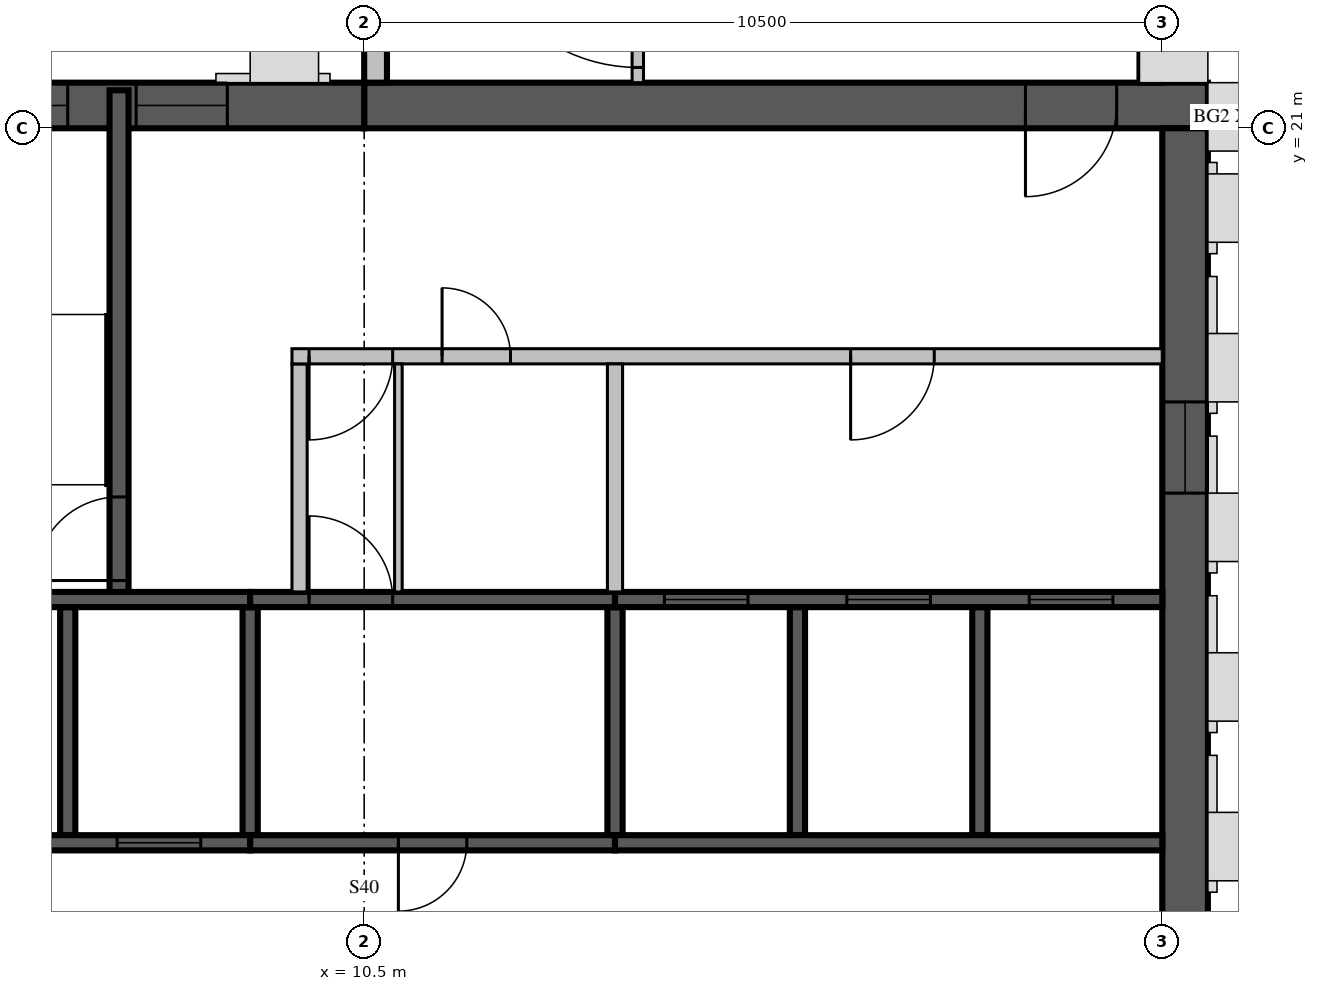
"""IFC4 building model, lengths in metres.
Left out: names, types, materials, properties, quantities, classifications, styles, units other than length and angle.
Written with IfcOpenShell. Run it as: python <this file> out.ifc"""

import sys

from ifc_helpers import new_model, si_unit, direction, frame, frame_2d, origin, place, context, subcontext, project, spatial, rectangle, extrude, source, transform, mapped, element, fill, save


model = new_model("IFC4")
c1 = context("Model", 3, precision=1e-05, world=origin(), true_north=direction((0.0, 1.0)))
c2 = subcontext(c1, "Body", "Model", "MODEL_VIEW")
j1 = project(units=[si_unit("LENGTHUNIT", "METRE"), si_unit("PLANEANGLEUNIT", "RADIAN")], contexts=[c1])
p1 = place(None, origin())
s1 = spatial("IfcSite", under=j1, at=p1, CompositionType="ELEMENT")
p2 = place(p1, origin())
s2 = spatial("IfcBuilding", under=s1, at=p2, CompositionType="ELEMENT")
p3 = place(p2, frame((0.0, 0.0, 344.0)))
s3 = spatial("IfcBuildingStorey", under=s2, at=p3, CompositionType="ELEMENT", Elevation=344.0)
m1 = source(origin(), c2, "Body", "SweptSolid", [
    extrude(rectangle(XDim=11.1, YDim=0.6, at=frame_2d((5.55, 0.0))), origin(), (0.0, 0.0, 1.0), 3.5),
])
p4 = place(p3, frame((10.5, 21.3, 0.0), z_axis=(0.0, 0.0, 1.0), x_axis=(1.0, 0.0, 0.0)))
e1 = element("IfcWall", 1, at=p4, inside=s3, PredefinedType="SHEAR", context=c2, shape_type="MappedRepresentation", body=[
    mapped(m1, transform((0.0, 0.0, 0.0), scale=1.0)),
])
m2 = source(origin(), c2, "Body", "SweptSolid", [
    extrude(rectangle(XDim=1.2, YDim=2.1, at=frame_2d((0.6, 1.05))), frame((0.0, 0.31, 0.0), z_axis=(0.0, -1.0, 0.0), x_axis=(1.0, 0.0, 0.0)), (0.0, 0.0, 1.0), 0.62),
])
p5 = place(p4, frame((8.7, 0.0, 0.0)))
e2 = element("IfcOpeningElement", 2, at=p5, cuts=e1, PredefinedType="OPENING", context=c2, shape_type="MappedRepresentation", body=[
    mapped(m2, transform((0.0, 0.0, 0.0), scale=1.0)),
])
m3 = source(origin(), c2, "Body", "SweptSolid", [
    extrude(rectangle(XDim=16.8, YDim=0.6, at=frame_2d((8.4, 0.0))), origin(), (0.0, 0.0, 1.0), 3.5),
])
p6 = place(p3, frame((21.3, 4.2, 0.0), z_axis=(0.0, 0.0, 1.0), x_axis=(0.0, 1.0, 0.0)))
e3 = element("IfcWall", 3, at=p6, inside=s3, PredefinedType="SHEAR", context=c2, shape_type="MappedRepresentation", body=[
    mapped(m3, transform((0.0, 0.0, 0.0), scale=1.0)),
])
m4 = source(origin(), c2, "Body", "SweptSolid", [
    extrude(rectangle(XDim=1.2, YDim=2.4, at=frame_2d((0.6, 1.2))), frame((0.0, 0.31, 0.0), z_axis=(0.0, -1.0, 0.0), x_axis=(1.0, 0.0, 0.0)), (0.0, 0.0, 1.0), 0.62),
])
p7 = place(p6, frame((12.0, 0.0, 0.6)))
e4 = element("IfcOpeningElement", 4, at=p7, cuts=e3, PredefinedType="OPENING", context=c2, shape_type="MappedRepresentation", body=[
    mapped(m4, transform((0.0, 0.0, 0.0), scale=1.0)),
])
m5 = source(origin(), c2, "Body", "SweptSolid", [
    extrude(rectangle(XDim=6.6, YDim=0.6, at=frame_2d((3.3, 0.0))), origin(), (0.0, 0.0, 1.0), 3.5),
])
p8 = place(p3, frame((3.9, 21.3, 0.0), z_axis=(0.0, 0.0, 1.0), x_axis=(1.0, 0.0, 0.0)))
e5 = element("IfcWall", 5, at=p8, inside=s3, PredefinedType="SHEAR", context=c2, shape_type="MappedRepresentation", body=[
    mapped(m5, transform((0.0, 0.0, 0.0), scale=1.0)),
])
p9 = place(p8, frame((1.5, 0.0, 0.6)))
e6 = element("IfcOpeningElement", 6, at=p9, cuts=e5, PredefinedType="OPENING", context=c2, shape_type="MappedRepresentation", body=[
    mapped(m4, transform((0.0, 0.0, 0.0), scale=1.0)),
])
p10 = place(p8, frame((3.6, 0.0, 0.6)))
e7 = element("IfcOpeningElement", 7, at=p10, cuts=e5, PredefinedType="OPENING", context=c2, shape_type="MappedRepresentation", body=[
    mapped(m4, transform((0.0, 0.0, 0.0), scale=1.0)),
])
m6 = source(origin(), c2, "Body", "SweptSolid", [
    extrude(rectangle(XDim=7.5, YDim=0.3, at=frame_2d((3.75, 0.0))), origin(), (0.0, 0.0, 1.0), 3.1),
])
p11 = place(p3, frame((20.85, 21.6, 0.0), z_axis=(0.0, 0.0, 1.0), x_axis=(0.0, 1.0, 0.0)))
e8 = element("IfcWall", 8, at=p11, inside=s3, PredefinedType="STANDARD", context=c2, shape_type="MappedRepresentation", body=[
    mapped(m6, transform((0.0, 0.0, 0.0), scale=1.0)),
])
m7 = source(origin(), c2, "Body", "SweptSolid", [
    extrude(rectangle(XDim=1.8, YDim=2.0, at=frame_2d((0.9, 1.0))), frame((0.0, 0.16, 0.0), z_axis=(0.0, -1.0, 0.0), x_axis=(1.0, 0.0, 0.0)), (0.0, 0.0, 1.0), 0.32),
])
p12 = place(p11, frame((0.463, 0.0, 0.6)))
e9 = element("IfcOpeningElement", 9, at=p12, cuts=e8, PredefinedType="OPENING", context=c2, shape_type="MappedRepresentation", body=[
    mapped(m7, transform((0.0, 0.0, 0.0), scale=1.0)),
])
m8 = source(origin(), c2, "Body", "SweptSolid", [
    extrude(rectangle(XDim=3.0, YDim=2.0, at=frame_2d((1.5, 1.0))), frame((0.0, 0.16, 0.0), z_axis=(0.0, -1.0, 0.0), x_axis=(1.0, 0.0, 0.0)), (0.0, 0.0, 1.0), 0.32),
])
p13 = place(p11, frame((4.2, 0.0, 0.6)))
e10 = element("IfcOpeningElement", 10, at=p13, cuts=e8, PredefinedType="OPENING", context=c2, shape_type="MappedRepresentation", body=[
    mapped(m8, transform((0.0, 0.0, 0.0), scale=1.0)),
])
p14 = place(p3, frame((10.65, 29.1, 0.0), z_axis=(0.0, 0.0, 1.0), x_axis=(0.0, -1.0, 0.0)))
e11 = element("IfcWall", 11, at=p14, inside=s3, PredefinedType="STANDARD", context=c2, shape_type="MappedRepresentation", body=[
    mapped(m6, transform((0.0, 0.0, 0.0), scale=1.0)),
])
m9 = source(origin(), c2, "Body", "SweptSolid", [
    extrude(rectangle(XDim=3.6, YDim=2.0, at=frame_2d((1.8, 1.0))), frame((0.0, 0.16, 0.0), z_axis=(0.0, -1.0, 0.0), x_axis=(1.0, 0.0, 0.0)), (0.0, 0.0, 1.0), 0.32),
])
p15 = place(p14, frame((3.36, 0.0, 0.6)))
e12 = element("IfcOpeningElement", 12, at=p15, cuts=e11, PredefinedType="OPENING", context=c2, shape_type="MappedRepresentation", body=[
    mapped(m9, transform((0.0, 0.0, 0.0), scale=1.0)),
])
m10 = source(origin(), c2, "Body", "SweptSolid", [
    extrude(rectangle(XDim=2.4, YDim=2.0, at=frame_2d((1.2, 1.0))), frame((0.0, 0.16, 0.0), z_axis=(0.0, -1.0, 0.0), x_axis=(1.0, 0.0, 0.0)), (0.0, 0.0, 1.0), 0.32),
])
p16 = place(p14, frame((0.48, 0.0, 0.6)))
e13 = element("IfcOpeningElement", 13, at=p16, cuts=e11, PredefinedType="OPENING", context=c2, shape_type="MappedRepresentation", body=[
    mapped(m10, transform((0.0, 0.0, 0.0), scale=1.0)),
])
m11 = source(origin(), c2, "Body", "SweptSolid", [
    extrude(rectangle(XDim=3.0, YDim=0.2, at=frame_2d((1.5, 0.0))), origin(), (0.0, 0.0, 1.0), 3.5),
])
p17 = place(p3, frame((6.6, 11.7, 0.0), z_axis=(0.0, 0.0, 1.0), x_axis=(0.0, 1.0, 0.0)))
e14 = element("IfcWall", 14, at=p17, inside=s3, PredefinedType="SOLIDWALL", context=c2, shape_type="MappedRepresentation", body=[
    mapped(m11, transform((0.0, 0.0, 0.0), scale=1.0)),
])
m12 = source(origin(), c2, "Body", "SweptSolid", [
    extrude(rectangle(XDim=3.0, YDim=0.2, at=frame_2d((1.5, 0.0))), origin(), (0.0, 0.0, 1.0), 3.1),
])
for number, where, z_axis, x_axis in (
    (15, (9.0, 11.7, 0.0), (0.0, 0.0, 1.0), (0.0, 1.0, 0.0)),
    (16, (13.8, 11.7, 0.0), (0.0, 0.0, 1.0), (0.0, 1.0, 0.0)),
):
    element("IfcWall", number, at=place(p3, frame(where, z_axis=z_axis, x_axis=x_axis)), inside=s3, PredefinedType="SOLIDWALL", context=c2, shape_type="MappedRepresentation", body=[
        mapped(m12, transform((0.0, 0.0, 0.0), scale=1.0)),
    ])
for number, where, z_axis, x_axis in (
    (17, (16.2, 11.7, 0.0), (0.0, 0.0, 1.0), (0.0, 1.0, 0.0)),
    (18, (18.6, 11.7, 0.0), (0.0, 0.0, 1.0), (0.0, 1.0, 0.0)),
):
    element("IfcWall", number, at=place(p3, frame(where, z_axis=z_axis, x_axis=x_axis)), inside=s3, PredefinedType="SOLIDWALL", context=c2, shape_type="MappedRepresentation", body=[
        mapped(m11, transform((0.0, 0.0, 0.0), scale=1.0)),
    ])
m13 = source(origin(), c2, "Body", "SweptSolid", [
    extrude(rectangle(XDim=4.8, YDim=0.2, at=frame_2d((2.4, 0.0))), origin(), (0.0, 0.0, 1.0), 3.5),
])
p18 = place(p3, frame((4.2, 11.6, 0.0), z_axis=(0.0, 0.0, 1.0), x_axis=(1.0, 0.0, 0.0)))
e19 = element("IfcWall", 19, at=p18, inside=s3, PredefinedType="SOLIDWALL", context=c2, shape_type="MappedRepresentation", body=[
    mapped(m13, transform((0.0, 0.0, 0.0), scale=1.0)),
])
m14 = source(origin(), c2, "Body", "SweptSolid", [
    extrude(rectangle(XDim=1.1, YDim=2.1, at=frame_2d((0.55, 1.05))), frame((0.0, 0.11, 0.0), z_axis=(0.0, -1.0, 0.0), x_axis=(1.0, 0.0, 0.0)), (0.0, 0.0, 1.0), 0.22),
])
p19 = place(p18, frame((0.65, 0.0, 0.0)))
e20 = element("IfcOpeningElement", 20, at=p19, cuts=e19, PredefinedType="OPENING", context=c2, shape_type="MappedRepresentation", body=[
    mapped(m14, transform((0.0, 0.0, 0.0), scale=1.0)),
])
p20 = place(p18, frame((3.05, 0.0, 0.0)))
e21 = element("IfcOpeningElement", 21, at=p20, cuts=e19, PredefinedType="OPENING", context=c2, shape_type="MappedRepresentation", body=[
    mapped(m14, transform((0.0, 0.0, 0.0), scale=1.0)),
])
m15 = source(origin(), c2, "Body", "SweptSolid", [
    extrude(rectangle(XDim=4.8, YDim=0.2, at=frame_2d((2.4, 0.0))), origin(), (0.0, 0.0, 1.0), 3.1),
])
p21 = place(p3, frame((9.0, 11.6, 0.0), z_axis=(0.0, 0.0, 1.0), x_axis=(1.0, 0.0, 0.0)))
e22 = element("IfcWall", 22, at=p21, inside=s3, PredefinedType="SOLIDWALL", context=c2, shape_type="MappedRepresentation", body=[
    mapped(m15, transform((0.0, 0.0, 0.0), scale=1.0)),
])
m16 = source(origin(), c2, "Body", "SweptSolid", [
    extrude(rectangle(XDim=0.9, YDim=2.1, at=frame_2d((0.45, 1.05))), frame((0.0, 0.11, 0.0), z_axis=(0.0, -1.0, 0.0), x_axis=(1.0, 0.0, 0.0)), (0.0, 0.0, 1.0), 0.22),
])
p22 = place(p21, frame((1.95, 0.0, 0.0)))
e23 = element("IfcOpeningElement", 23, at=p22, cuts=e22, PredefinedType="OPENING", context=c2, shape_type="MappedRepresentation", body=[
    mapped(m16, transform((0.0, 0.0, 0.0), scale=1.0)),
])
m17 = source(origin(), c2, "Body", "SweptSolid", [
    extrude(rectangle(XDim=7.2, YDim=0.2, at=frame_2d((3.6, 0.0))), origin(), (0.0, 0.0, 1.0), 3.5),
])
p23 = place(p3, frame((13.8, 11.6, 0.0), z_axis=(0.0, 0.0, 1.0), x_axis=(1.0, 0.0, 0.0)))
e24 = element("IfcWall", 24, at=p23, inside=s3, PredefinedType="SOLIDWALL", context=c2, shape_type="MappedRepresentation", body=[
    mapped(m17, transform((0.0, 0.0, 0.0), scale=1.0)),
])
p24 = place(p3, frame((4.2, 14.8, 0.0), z_axis=(0.0, 0.0, 1.0), x_axis=(1.0, 0.0, 0.0)))
e25 = element("IfcWall", 25, at=p24, inside=s3, PredefinedType="SOLIDWALL", context=c2, shape_type="MappedRepresentation", body=[
    mapped(m13, transform((0.0, 0.0, 0.0), scale=1.0)),
])
p25 = place(p3, frame((9.0, 14.8, 0.0), z_axis=(0.0, 0.0, 1.0), x_axis=(1.0, 0.0, 0.0)))
e26 = element("IfcWall", 26, at=p25, inside=s3, PredefinedType="SOLIDWALL", context=c2, shape_type="MappedRepresentation", body=[
    mapped(m15, transform((0.0, 0.0, 0.0), scale=1.0)),
])
p26 = place(p25, frame((0.775, 0.0, 0.0)))
e27 = element("IfcOpeningElement", 27, at=p26, cuts=e26, PredefinedType="OPENING", context=c2, shape_type="MappedRepresentation", body=[
    mapped(m14, transform((0.0, 0.0, 0.0), scale=1.0)),
])
p27 = place(p3, frame((13.8, 14.8, 0.0), z_axis=(0.0, 0.0, 1.0), x_axis=(1.0, 0.0, 0.0)))
e28 = element("IfcWall", 28, at=p27, inside=s3, PredefinedType="SOLIDWALL", context=c2, shape_type="MappedRepresentation", body=[
    mapped(m17, transform((0.0, 0.0, 0.0), scale=1.0)),
])
p28 = place(p27, frame((0.65, 0.0, 0.0)))
e29 = element("IfcOpeningElement", 29, at=p28, cuts=e28, PredefinedType="OPENING", context=c2, shape_type="MappedRepresentation", body=[
    mapped(m14, transform((0.0, 0.0, 0.0), scale=1.0)),
])
p29 = place(p27, frame((3.05, 0.0, 0.0)))
e30 = element("IfcOpeningElement", 30, at=p29, cuts=e28, PredefinedType="OPENING", context=c2, shape_type="MappedRepresentation", body=[
    mapped(m14, transform((0.0, 0.0, 0.0), scale=1.0)),
])
p30 = place(p27, frame((5.45, 0.0, 0.0)))
e31 = element("IfcOpeningElement", 31, at=p30, cuts=e28, PredefinedType="OPENING", context=c2, shape_type="MappedRepresentation", body=[
    mapped(m14, transform((0.0, 0.0, 0.0), scale=1.0)),
])
m18 = source(origin(), c2, "Body", "SweptSolid", [
    extrude(rectangle(XDim=6.6, YDim=0.25, at=frame_2d((3.3, 0.0))), origin(), (0.0, 0.0, 1.0), 3.1),
])
p31 = place(p3, frame((7.275, 14.9, 0.0), z_axis=(0.0, 0.0, 1.0), x_axis=(0.0, 1.0, 0.0)))
e32 = element("IfcWall", 32, at=p31, inside=s3, PredefinedType="SOLIDWALL", context=c2, shape_type="MappedRepresentation", body=[
    mapped(m18, transform((0.0, 0.0, 0.0), scale=1.0)),
])
m19 = source(origin(), c2, "Body", "SweptSolid", [
    extrude(rectangle(XDim=1.1, YDim=2.1, at=frame_2d((0.55, 1.05))), frame((0.0, 0.135, 0.0), z_axis=(0.0, -1.0, 0.0), x_axis=(1.0, 0.0, 0.0)), (0.0, 0.0, 1.0), 0.27),
])
p32 = place(p31, frame((0.15, 0.0, 0.0)))
e33 = element("IfcOpeningElement", 33, at=p32, cuts=e32, PredefinedType="OPENING", context=c2, shape_type="MappedRepresentation", body=[
    mapped(m19, transform((0.0, 0.0, 0.0), scale=1.0)),
])
m20 = source(origin(), c2, "Body", "SweptSolid", [
    extrude(rectangle(XDim=3.0, YDim=0.2, at=frame_2d((1.5, 0.0))), origin(), (0.0, 0.0, 1.0), 3.1),
])
p33 = place(p3, frame((9.65, 14.9, 0.0), z_axis=(0.0, 0.0, 1.0), x_axis=(0.0, 1.0, 0.0)))
e34 = element("IfcWall", 34, at=p33, inside=s3, PredefinedType="PARTITIONING", context=c2, shape_type="MappedRepresentation", body=[
    mapped(m20, transform((0.0, 0.0, 0.0), scale=1.0)),
])
m21 = source(origin(), c2, "Body", "SweptSolid", [
    extrude(rectangle(XDim=11.45, YDim=0.2, at=frame_2d((5.725, 0.0))), origin(), (0.0, 0.0, 1.0), 3.1),
])
p34 = place(p3, frame((9.55, 18.0, 0.0), z_axis=(0.0, 0.0, 1.0), x_axis=(1.0, 0.0, 0.0)))
e35 = element("IfcWall", 35, at=p34, inside=s3, PredefinedType="PARTITIONING", context=c2, shape_type="MappedRepresentation", body=[
    mapped(m21, transform((0.0, 0.0, 0.0), scale=1.0)),
])
p35 = place(p34, frame((0.225, 0.0, 0.0)))
e36 = element("IfcOpeningElement", 36, at=p35, cuts=e35, PredefinedType="OPENING", context=c2, shape_type="MappedRepresentation", body=[
    mapped(m14, transform((0.0, 0.0, 0.0), scale=1.0)),
])
p36 = place(p34, frame((1.975, 0.0, 0.0)))
e37 = element("IfcOpeningElement", 37, at=p36, cuts=e35, PredefinedType="OPENING", context=c2, shape_type="MappedRepresentation", body=[
    mapped(m16, transform((0.0, 0.0, 0.0), scale=1.0)),
])
p37 = place(p34, frame((7.35, 0.0, 0.0)))
e38 = element("IfcOpeningElement", 38, at=p37, cuts=e35, PredefinedType="OPENING", context=c2, shape_type="MappedRepresentation", body=[
    mapped(m14, transform((0.0, 0.0, 0.0), scale=1.0)),
])
p38 = place(p3, frame((13.8, 14.9, 0.0), z_axis=(0.0, 0.0, 1.0), x_axis=(0.0, 1.0, 0.0)))
e39 = element("IfcWall", 39, at=p38, inside=s3, PredefinedType="PARTITIONING", context=c2, shape_type="MappedRepresentation", body=[
    mapped(m20, transform((0.0, 0.0, 0.0), scale=1.0)),
])
m22 = source(origin(), c2, "Body", "SweptSolid", [
    extrude(rectangle(XDim=3.0, YDim=0.1, at=frame_2d((1.5, 0.0))), origin(), (0.0, 0.0, 1.0), 3.1),
])
p39 = place(p3, frame((10.95, 14.9, 0.0), z_axis=(0.0, 0.0, 1.0), x_axis=(0.0, 1.0, 0.0)))
e40 = element("IfcWall", 40, at=p39, inside=s3, PredefinedType="PARTITIONING", context=c2, shape_type="MappedRepresentation", body=[
    mapped(m22, transform((0.0, 0.0, 0.0), scale=1.0)),
])
m23 = source(origin(), c2, "Body", "SweptSolid", [
    extrude(rectangle(XDim=7.725, YDim=0.15, at=frame_2d((3.862, 0.0))), origin(), (0.0, 0.0, 1.0), 3.1),
])
p40 = place(p3, frame((14.1, 29.325, 0.0), z_axis=(0.0, 0.0, 1.0), x_axis=(0.0, -1.0, 0.0)))
e41 = element("IfcWall", 41, at=p40, inside=s3, PredefinedType="PARTITIONING", context=c2, shape_type="MappedRepresentation", body=[
    mapped(m23, transform((0.0, 0.0, 0.0), scale=1.0)),
])
m24 = source(origin(), c2, "Body", "SweptSolid", [
    extrude(rectangle(XDim=2.2, YDim=2.1, at=frame_2d((1.1, 1.05))), frame((0.0, 0.085, 0.0), z_axis=(0.0, -1.0, 0.0), x_axis=(1.0, 0.0, 0.0)), (0.0, 0.0, 1.0), 0.17),
])
p41 = place(p40, frame((5.325, 0.0, 0.0)))
e42 = element("IfcOpeningElement", 42, at=p41, cuts=e41, PredefinedType="OPENING", context=c2, shape_type="MappedRepresentation", body=[
    mapped(m24, transform((0.0, 0.0, 0.0), scale=1.0)),
])
m25 = source(origin(), c2, "Body", "SweptSolid", [
    extrude(rectangle(XDim=1.1, YDim=2.1, at=frame_2d((0.55, 1.05))), frame((0.0, 0.025, 0.0), z_axis=(0.0, -1.0, 0.0), x_axis=(1.0, 0.0, 0.0)), (0.0, 0.0, 1.0), 0.05),
])
p42 = place(p20, origin())
e43 = element("IfcDoor", 43, at=p42, inside=s3, OperationType="SLIDING_TO_LEFT", PredefinedType="DOOR", context=c2, shape_type="MappedRepresentation", body=[
    mapped(m25, transform((0.0, 0.0, 0.0), scale=1.0)),
])
fill(e21, e43)
m26 = source(origin(), c2, "Body", "SweptSolid", [
    extrude(rectangle(XDim=0.9, YDim=2.1, at=frame_2d((0.45, 1.05))), frame((0.0, 0.025, 0.0), z_axis=(0.0, -1.0, 0.0), x_axis=(1.0, 0.0, 0.0)), (0.0, 0.0, 1.0), 0.05),
])
p43 = place(p22, origin())
e44 = element("IfcDoor", 44, at=p43, inside=s3, OperationType="SINGLE_SWING_RIGHT", PredefinedType="DOOR", context=c2, shape_type="MappedRepresentation", body=[
    mapped(m26, transform((0.0, 0.0, 0.0), scale=1.0)),
])
fill(e23, e44)
p44 = place(p26, origin())
e45 = element("IfcDoor", 45, at=p44, inside=s3, OperationType="SINGLE_SWING_LEFT", PredefinedType="DOOR", context=c2, shape_type="MappedRepresentation", body=[
    mapped(m25, transform((0.0, 0.0, 0.0), scale=1.0)),
])
fill(e27, e45)
p45 = place(p28, origin())
e46 = element("IfcDoor", 46, at=p45, inside=s3, OperationType="SLIDING_TO_LEFT", PredefinedType="DOOR", context=c2, shape_type="MappedRepresentation", body=[
    mapped(m25, transform((0.0, 0.0, 0.0), scale=1.0)),
])
fill(e29, e46)
p46 = place(p29, origin())
e47 = element("IfcDoor", 47, at=p46, inside=s3, OperationType="SLIDING_TO_LEFT", PredefinedType="DOOR", context=c2, shape_type="MappedRepresentation", body=[
    mapped(m25, transform((0.0, 0.0, 0.0), scale=1.0)),
])
fill(e30, e47)
p47 = place(p30, origin())
e48 = element("IfcDoor", 48, at=p47, inside=s3, OperationType="SLIDING_TO_LEFT", PredefinedType="DOOR", context=c2, shape_type="MappedRepresentation", body=[
    mapped(m25, transform((0.0, 0.0, 0.0), scale=1.0)),
])
fill(e31, e48)
p48 = place(p32, origin())
e49 = element("IfcDoor", 49, at=p48, inside=s3, OperationType="SINGLE_SWING_LEFT", PredefinedType="DOOR", context=c2, shape_type="MappedRepresentation", body=[
    mapped(m25, transform((0.0, 0.0, 0.0), scale=1.0)),
])
fill(e33, e49)
p49 = place(p35, origin())
e50 = element("IfcDoor", 50, at=p49, inside=s3, OperationType="SINGLE_SWING_RIGHT", PredefinedType="DOOR", context=c2, shape_type="MappedRepresentation", body=[
    mapped(m25, transform((0.0, 0.0, 0.0), scale=1.0)),
])
fill(e36, e50)
p50 = place(p36, origin())
e51 = element("IfcDoor", 51, at=p50, inside=s3, OperationType="SINGLE_SWING_LEFT", PredefinedType="DOOR", context=c2, shape_type="MappedRepresentation", body=[
    mapped(m26, transform((0.0, 0.0, 0.0), scale=1.0)),
])
fill(e37, e51)
p51 = place(p37, origin())
e52 = element("IfcDoor", 52, at=p51, inside=s3, OperationType="SINGLE_SWING_RIGHT", PredefinedType="DOOR", context=c2, shape_type="MappedRepresentation", body=[
    mapped(m25, transform((0.0, 0.0, 0.0), scale=1.0)),
])
fill(e38, e52)
m27 = source(origin(), c2, "Body", "SweptSolid", [
    extrude(rectangle(XDim=1.2, YDim=2.1, at=frame_2d((0.6, 1.05))), frame((0.0, 0.025, 0.0), z_axis=(0.0, -1.0, 0.0), x_axis=(1.0, 0.0, 0.0)), (0.0, 0.0, 1.0), 0.05),
])
p52 = place(p5, origin())
e53 = element("IfcDoor", 53, at=p52, inside=s3, OperationType="SINGLE_SWING_RIGHT", PredefinedType="DOOR", context=c2, shape_type="MappedRepresentation", body=[
    mapped(m27, transform((0.0, 0.0, 0.0), scale=1.0)),
])
fill(e2, e53)
m28 = source(origin(), c2, "Body", "SweptSolid", [
    extrude(rectangle(XDim=1.2, YDim=2.4, at=frame_2d((0.6, 1.2))), frame((0.0, 0.03, 0.0), z_axis=(0.0, -1.0, 0.0), x_axis=(1.0, 0.0, 0.0)), (0.0, 0.0, 1.0), 0.06),
])
p53 = place(p7, origin())
e54 = element("IfcWindow", 54, at=p53, inside=s3, PartitioningType="SINGLE_PANEL", PredefinedType="WINDOW", context=c2, shape_type="MappedRepresentation", body=[
    mapped(m28, transform((0.0, 0.0, 0.0), scale=1.0)),
])
fill(e4, e54)
p54 = place(p9, origin())
e55 = element("IfcWindow", 55, at=p54, inside=s3, PartitioningType="SINGLE_PANEL", PredefinedType="WINDOW", context=c2, shape_type="MappedRepresentation", body=[
    mapped(m28, transform((0.0, 0.0, 0.0), scale=1.0)),
])
fill(e6, e55)
p55 = place(p10, origin())
e56 = element("IfcWindow", 56, at=p55, inside=s3, PartitioningType="SINGLE_PANEL", PredefinedType="WINDOW", context=c2, shape_type="MappedRepresentation", body=[
    mapped(m28, transform((0.0, 0.0, 0.0), scale=1.0)),
])
fill(e7, e56)
m29 = source(origin(), c2, "Body", "SweptSolid", [
    extrude(rectangle(XDim=2.2, YDim=2.1, at=frame_2d((1.1, 1.05))), frame((0.0, 0.025, 0.0), z_axis=(0.0, -1.0, 0.0), x_axis=(1.0, 0.0, 0.0)), (0.0, 0.0, 1.0), 0.05),
])
p56 = place(p41, origin())
e57 = element("IfcDoor", 57, at=p56, inside=s3, OperationType="DOUBLE_DOOR_SINGLE_SWING", PredefinedType="DOOR", context=c2, shape_type="MappedRepresentation", body=[
    mapped(m29, transform((0.0, 0.0, 0.0), scale=1.0)),
])
fill(e42, e57)
save(model, sys.argv[1])
